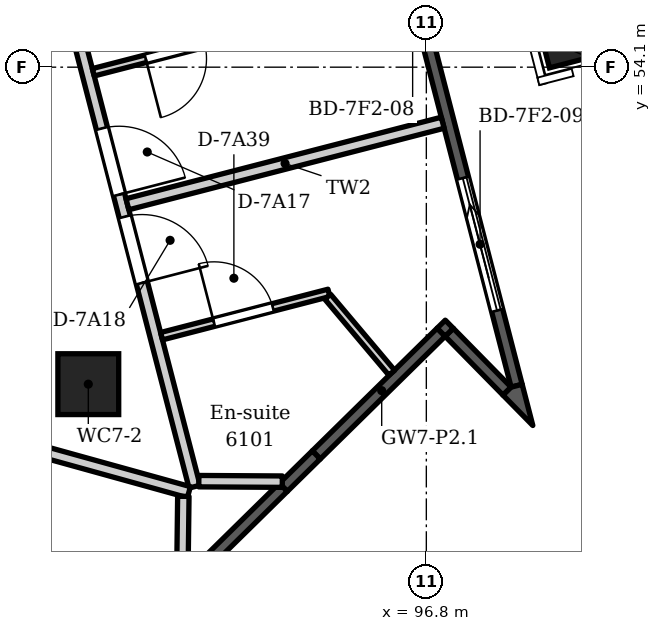
"""IFC4 building model, lengths in metres.
Left out: names, types, materials, properties, quantities, classifications, styles, units other than length and angle.
Written with IfcOpenShell. Run it as: python <this file> out.ifc"""

import sys

from ifc_helpers import new_model, si_unit, direction, frame, frame_2d, origin, origin_2d, place, context, subcontext, project, spatial, polyline, rectangle, circle, outline, extrude, element, fill, save


model = new_model("IFC4")
c1 = context("Model", 3, precision=1e-05, world=origin(), true_north=direction((0.0, 1.0)))
c2 = subcontext(c1, "Body", "Model", "MODEL_VIEW")
j1 = project(units=[si_unit("LENGTHUNIT", "METRE"), si_unit("PLANEANGLEUNIT", "RADIAN")], contexts=[c1])
p1 = place(None, origin())
s1 = spatial("IfcSite", under=j1, at=p1, CompositionType="ELEMENT")
p2 = place(p1, origin())
s2 = spatial("IfcBuilding", under=s1, at=p2, CompositionType="ELEMENT")
p3 = place(p2, frame((0.0, 0.0, 234.9)))
s3 = spatial("IfcBuildingStorey", under=s2, at=p3, CompositionType="ELEMENT", Elevation=234.9)
p4 = place(p3, frame((98.623, 54.505, -0.35), z_axis=(0.0, 0.0, 1.0), x_axis=(-0.250380004054, 0.968147640378, 0.0)))
e1 = element("IfcColumn", 1, at=p4, inside=s3, PredefinedType="COLUMN", context=c2, shape_type="SweptSolid", body=[
    extrude(rectangle(XDim=0.7, YDim=0.6, at=origin_2d()), origin(), (0.0, 0.0, 1.0), 3.95),
])
p5 = place(p3, frame((92.353, 49.93, -0.35), z_axis=(0.0, 0.0, 1.0), x_axis=(1.0, 0.0, 0.0)))
e2 = element("IfcColumn", 2, at=p5, inside=s3, PredefinedType="COLUMN", context=c2, shape_type="SweptSolid", body=[
    extrude(circle(Radius=0.4, at=origin_2d()), origin(), (0.0, 0.0, 1.0), 3.95),
])
p6 = place(p3, frame((89.591, 82.378, 0.0), z_axis=(0.0, 0.0, 1.0), x_axis=(0.250378839788, -0.968147941477, 0.0)))
e3 = element("IfcWall", 3, at=p6, inside=s3, PredefinedType="SOLIDWALL", context=c2, shape_type="SweptSolid", body=[
    extrude(outline(polyline([(0.149, 0.075), (0.149, -0.075), (33.537, -0.075), (33.537, 0.075), (0.149, 0.075)])), origin(), (0.0, 0.0, 1.0), 3.3),
])
p7 = place(p6, frame((1.171, 0.0, 0.0)))
e4 = element("IfcOpeningElement", 4, at=p7, cuts=e3, PredefinedType="OPENING", context=c2, shape_type="SweptSolid", body=[
    extrude(rectangle(XDim=1.8, YDim=2.6, at=frame_2d((0.9, 1.3))), frame((0.0, 0.085, 0.0), z_axis=(0.0, -1.0, 0.0), x_axis=(1.0, 0.0, 0.0)), (0.0, 0.0, 1.0), 0.17),
])
p8 = place(p6, frame((4.714, 0.0, 0.0)))
e5 = element("IfcOpeningElement", 5, at=p8, cuts=e3, PredefinedType="OPENING", context=c2, shape_type="SweptSolid", body=[
    extrude(rectangle(XDim=1.8, YDim=2.6, at=frame_2d((0.9, 1.3))), frame((0.0, 0.085, 0.0), z_axis=(0.0, -1.0, 0.0), x_axis=(1.0, 0.0, 0.0)), (0.0, 0.0, 1.0), 0.17),
])
p9 = place(p6, frame((8.457, 0.0, 0.0)))
e6 = element("IfcOpeningElement", 6, at=p9, cuts=e3, PredefinedType="OPENING", context=c2, shape_type="SweptSolid", body=[
    extrude(rectangle(XDim=1.8, YDim=2.6, at=frame_2d((0.9, 1.3))), frame((0.0, 0.085, 0.0), z_axis=(0.0, -1.0, 0.0), x_axis=(1.0, 0.0, 0.0)), (0.0, 0.0, 1.0), 0.17),
])
p10 = place(p6, frame((12.2, 0.0, 0.0)))
e7 = element("IfcOpeningElement", 7, at=p10, cuts=e3, PredefinedType="OPENING", context=c2, shape_type="SweptSolid", body=[
    extrude(rectangle(XDim=1.8, YDim=2.6, at=frame_2d((0.9, 1.3))), frame((0.0, 0.085, 0.0), z_axis=(0.0, -1.0, 0.0), x_axis=(1.0, 0.0, 0.0)), (0.0, 0.0, 1.0), 0.17),
])
p11 = place(p6, frame((15.943, 0.0, 0.0)))
e8 = element("IfcOpeningElement", 8, at=p11, cuts=e3, PredefinedType="OPENING", context=c2, shape_type="SweptSolid", body=[
    extrude(rectangle(XDim=1.8, YDim=2.6, at=frame_2d((0.9, 1.3))), frame((0.0, 0.085, 0.0), z_axis=(0.0, -1.0, 0.0), x_axis=(1.0, 0.0, 0.0)), (0.0, 0.0, 1.0), 0.17),
])
p12 = place(p6, frame((19.686, 0.0, 0.0)))
e9 = element("IfcOpeningElement", 9, at=p12, cuts=e3, PredefinedType="OPENING", context=c2, shape_type="SweptSolid", body=[
    extrude(rectangle(XDim=1.8, YDim=2.6, at=frame_2d((0.9, 1.3))), frame((0.0, 0.085, 0.0), z_axis=(0.0, -1.0, 0.0), x_axis=(1.0, 0.0, 0.0)), (0.0, 0.0, 1.0), 0.17),
])
p13 = place(p6, frame((23.429, 0.0, 0.0)))
e10 = element("IfcOpeningElement", 10, at=p13, cuts=e3, PredefinedType="OPENING", context=c2, shape_type="SweptSolid", body=[
    extrude(rectangle(XDim=1.8, YDim=2.6, at=frame_2d((0.9, 1.3))), frame((0.0, 0.085, 0.0), z_axis=(0.0, -1.0, 0.0), x_axis=(1.0, 0.0, 0.0)), (0.0, 0.0, 1.0), 0.17),
])
p14 = place(p6, frame((27.172, 0.0, 0.0)))
e11 = element("IfcOpeningElement", 11, at=p14, cuts=e3, PredefinedType="OPENING", context=c2, shape_type="SweptSolid", body=[
    extrude(rectangle(XDim=1.8, YDim=2.6, at=frame_2d((0.9, 1.3))), frame((0.0, 0.085, 0.0), z_axis=(0.0, -1.0, 0.0), x_axis=(1.0, 0.0, 0.0)), (0.0, 0.0, 1.0), 0.17),
])
p15 = place(p6, frame((30.715, 0.0, 0.0)))
e12 = element("IfcOpeningElement", 12, at=p15, cuts=e3, PredefinedType="OPENING", context=c2, shape_type="SweptSolid", body=[
    extrude(rectangle(XDim=1.8, YDim=2.6, at=frame_2d((0.9, 1.3))), frame((0.0, 0.085, 0.0), z_axis=(0.0, -1.0, 0.0), x_axis=(1.0, 0.0, 0.0)), (0.0, 0.0, 1.0), 0.17),
])
p16 = place(p3, frame((97.967, 49.731, 0.0), z_axis=(0.0, 0.0, 1.0), x_axis=(-0.700999978355, 0.71316129336, 0.0)))
e13 = element("IfcWall", 13, at=p16, inside=s3, PredefinedType="SOLIDWALL", context=c2, shape_type="SweptSolid", body=[
    extrude(outline(polyline([(0.149, 0.075), (0.149, -0.075), (1.235, -0.075), (1.235, 0.075), (0.149, 0.075)])), origin(), (0.0, 0.0, 1.0), 3.3),
])
p17 = place(p3, frame((97.073, 50.69, 0.0), z_axis=(0.0, 0.0, 1.0), x_axis=(-0.713250368354, -0.700909346522, 0.0)))
e14 = element("IfcWall", 14, at=p17, inside=s3, PredefinedType="SOLIDWALL", context=c2, shape_type="SweptSolid", body=[
    extrude(outline(polyline([(0.11, -0.075), (2.414, -0.075), (2.414, 0.075), (0.11, 0.075), (0.11, -0.075)])), origin(), (0.0, 0.0, 1.0), 3.3),
])
p18 = place(p3, frame((95.352, 48.999, 0.0), z_axis=(0.0, 0.0, 1.0), x_axis=(-0.713304727682, -0.700854025791, 0.0)))
e15 = element("IfcWall", 15, at=p18, inside=s3, PredefinedType="SOLIDWALL", context=c2, shape_type="SweptSolid", body=[
    extrude(outline(polyline([(0.0, -0.075), (0.608, -0.075), (0.608, 0.075), (0.0, 0.075), (0.0, -0.075)])), origin(), (0.0, 0.0, 1.0), 2.75),
])
p19 = place(p3, frame((94.918, 48.573, 0.0), z_axis=(0.0, 0.0, 1.0), x_axis=(-0.713193839807, -0.700966865737, 0.0)))
e16 = element("IfcWall", 16, at=p19, inside=s3, PredefinedType="SOLIDWALL", context=c2, shape_type="SweptSolid", body=[
    extrude(outline(polyline([(0.0, -0.075), (1.757, -0.075), (1.757, 0.075), (0.0, 0.075), (0.0, -0.075)])), origin(), (0.0, 0.0, 1.0), 3.3),
])
p20 = place(p3, frame((92.419, 44.255, 0.0), z_axis=(0.0, 0.0, 1.0), x_axis=(-0.963630586427, 0.267237895708, 0.0)))
e17 = element("IfcWall", 17, at=p20, inside=s3, PredefinedType="SOLIDWALL", context=c2, shape_type="SweptSolid", body=[
    extrude(outline(polyline([(0.149, 0.075), (0.149, -0.075), (33.537, -0.075), (33.537, 0.075), (0.149, 0.075)])), origin(), (0.0, 0.0, 1.0), 3.3),
])
p21 = place(p20, frame((1.171, 0.0, 0.0)))
e18 = element("IfcOpeningElement", 18, at=p21, cuts=e17, PredefinedType="OPENING", context=c2, shape_type="SweptSolid", body=[
    extrude(rectangle(XDim=1.8, YDim=2.6, at=frame_2d((0.9, 1.3))), frame((0.0, 0.085, 0.0), z_axis=(0.0, -1.0, 0.0), x_axis=(1.0, 0.0, 0.0)), (0.0, 0.0, 1.0), 0.17),
])
p22 = place(p20, frame((4.714, 0.0, 0.0)))
e19 = element("IfcOpeningElement", 19, at=p22, cuts=e17, PredefinedType="OPENING", context=c2, shape_type="SweptSolid", body=[
    extrude(rectangle(XDim=1.8, YDim=2.6, at=frame_2d((0.9, 1.3))), frame((0.0, 0.085, 0.0), z_axis=(0.0, -1.0, 0.0), x_axis=(1.0, 0.0, 0.0)), (0.0, 0.0, 1.0), 0.17),
])
p23 = place(p20, frame((8.457, 0.0, 0.0)))
e20 = element("IfcOpeningElement", 20, at=p23, cuts=e17, PredefinedType="OPENING", context=c2, shape_type="SweptSolid", body=[
    extrude(rectangle(XDim=1.8, YDim=2.6, at=frame_2d((0.9, 1.3))), frame((0.0, 0.085, 0.0), z_axis=(0.0, -1.0, 0.0), x_axis=(1.0, 0.0, 0.0)), (0.0, 0.0, 1.0), 0.17),
])
p24 = place(p20, frame((12.2, 0.0, 0.0)))
e21 = element("IfcOpeningElement", 21, at=p24, cuts=e17, PredefinedType="OPENING", context=c2, shape_type="SweptSolid", body=[
    extrude(rectangle(XDim=1.8, YDim=2.6, at=frame_2d((0.9, 1.3))), frame((0.0, 0.085, 0.0), z_axis=(0.0, -1.0, 0.0), x_axis=(1.0, 0.0, 0.0)), (0.0, 0.0, 1.0), 0.17),
])
p25 = place(p20, frame((15.943, 0.0, 0.0)))
e22 = element("IfcOpeningElement", 22, at=p25, cuts=e17, PredefinedType="OPENING", context=c2, shape_type="SweptSolid", body=[
    extrude(rectangle(XDim=1.8, YDim=2.6, at=frame_2d((0.9, 1.3))), frame((0.0, 0.085, 0.0), z_axis=(0.0, -1.0, 0.0), x_axis=(1.0, 0.0, 0.0)), (0.0, 0.0, 1.0), 0.17),
])
p26 = place(p20, frame((19.686, 0.0, 0.0)))
e23 = element("IfcOpeningElement", 23, at=p26, cuts=e17, PredefinedType="OPENING", context=c2, shape_type="SweptSolid", body=[
    extrude(rectangle(XDim=1.8, YDim=2.6, at=frame_2d((0.9, 1.3))), frame((0.0, 0.085, 0.0), z_axis=(0.0, -1.0, 0.0), x_axis=(1.0, 0.0, 0.0)), (0.0, 0.0, 1.0), 0.17),
])
p27 = place(p20, frame((23.429, 0.0, 0.0)))
e24 = element("IfcOpeningElement", 24, at=p27, cuts=e17, PredefinedType="OPENING", context=c2, shape_type="SweptSolid", body=[
    extrude(rectangle(XDim=1.8, YDim=2.6, at=frame_2d((0.9, 1.3))), frame((0.0, 0.085, 0.0), z_axis=(0.0, -1.0, 0.0), x_axis=(1.0, 0.0, 0.0)), (0.0, 0.0, 1.0), 0.17),
])
p28 = place(p20, frame((27.172, 0.0, 0.0)))
e25 = element("IfcOpeningElement", 25, at=p28, cuts=e17, PredefinedType="OPENING", context=c2, shape_type="SweptSolid", body=[
    extrude(rectangle(XDim=1.8, YDim=2.6, at=frame_2d((0.9, 1.3))), frame((0.0, 0.085, 0.0), z_axis=(0.0, -1.0, 0.0), x_axis=(1.0, 0.0, 0.0)), (0.0, 0.0, 1.0), 0.17),
])
p29 = place(p20, frame((30.715, 0.0, 0.0)))
e26 = element("IfcOpeningElement", 26, at=p29, cuts=e17, PredefinedType="OPENING", context=c2, shape_type="SweptSolid", body=[
    extrude(rectangle(XDim=1.8, YDim=2.6, at=frame_2d((0.9, 1.3))), frame((0.0, 0.085, 0.0), z_axis=(0.0, -1.0, 0.0), x_axis=(1.0, 0.0, 0.0)), (0.0, 0.0, 1.0), 0.17),
])
p30 = place(p3, origin())
e27 = element("IfcWall", 27, at=p30, inside=s3, PredefinedType="PARAPET", context=c2, shape_type="SweptSolid", body=[
    extrude(outline(polyline([(59.388, 50.961), (96.326, 36.411), (96.275, 36.753), (62.154, 50.194), (59.388, 50.961)])), origin(), (0.0, 0.0, 1.0), 1.1),
])
p31 = place(p3, origin())
e28 = element("IfcWall", 28, at=p31, inside=s3, PredefinedType="PARAPET", context=c2, shape_type="SweptSolid", body=[
    extrude(outline(polyline([(100.299, 50.419), (94.431, 89.683), (94.16, 89.468), (99.581, 53.198), (100.299, 50.419)])), origin(), (0.0, 0.0, 1.0), 1.1),
])
p32 = place(p3, frame((91.355, 57.841, 0.0), z_axis=(0.0, 0.0, 1.0), x_axis=(0.25042530879, -0.968135922646, 0.0)))
e29 = element("IfcWall", 29, at=p32, inside=s3, PredefinedType="PARTITIONING", context=c2, shape_type="SweptSolid", body=[
    extrude(rectangle(XDim=9.565, YDim=0.15, at=frame_2d((4.782, 0.0))), origin(), (0.0, 0.0, 1.0), 2.75),
])
p33 = place(p32, frame((4.697, 0.0, 0.0)))
e30 = element("IfcOpeningElement", 30, at=p33, cuts=e29, PredefinedType="OPENING", context=c2, shape_type="SweptSolid", body=[
    extrude(rectangle(XDim=0.9, YDim=2.1, at=frame_2d((0.45, 1.05))), frame((0.0, 0.085, 0.0), z_axis=(0.0, -1.0, 0.0), x_axis=(1.0, 0.0, 0.0)), (0.0, 0.0, 1.0), 0.17),
])
p34 = place(p32, frame((5.897, 0.0, 0.0)))
e31 = element("IfcOpeningElement", 31, at=p34, cuts=e29, PredefinedType="OPENING", context=c2, shape_type="SweptSolid", body=[
    extrude(rectangle(XDim=0.9, YDim=2.1, at=frame_2d((0.45, 1.05))), frame((0.0, 0.085, 0.0), z_axis=(0.0, -1.0, 0.0), x_axis=(1.0, 0.0, 0.0)), (0.0, 0.0, 1.0), 0.17),
])
p35 = place(p3, frame((91.673, 49.064, 0.0), z_axis=(0.0, 0.0, 1.0), x_axis=(0.963652381101, -0.267159294054, 0.0)))
e32 = element("IfcWall", 32, at=p35, inside=s3, PredefinedType="PARTITIONING", context=c2, shape_type="SweptSolid", body=[
    extrude(rectangle(XDim=2.079, YDim=0.15, at=frame_2d((1.04, 0.0))), origin(), (0.0, 0.0, 1.0), 2.75),
])
p36 = place(p3, frame((92.419, 54.033, 0.0), z_axis=(0.0, 0.0, 1.0), x_axis=(0.968205218878, 0.250157258814, 0.0)))
e33 = element("IfcWall", 33, at=p36, inside=s3, PredefinedType="PARTITIONING", context=c2, shape_type="SweptSolid", body=[
    extrude(rectangle(XDim=2.274, YDim=0.1, at=frame_2d((1.137, 0.0))), origin(), (0.0, 0.0, 1.0), 3.3),
])
p37 = place(p36, frame((0.712, 0.0, 0.0)))
e34 = element("IfcOpeningElement", 34, at=p37, cuts=e33, PredefinedType="OPENING", context=c2, shape_type="SweptSolid", body=[
    extrude(rectangle(XDim=0.8, YDim=2.1, at=frame_2d((0.4, 1.05))), frame((0.0, 0.06, 0.0), z_axis=(0.0, -1.0, 0.0), x_axis=(1.0, 0.0, 0.0)), (0.0, 0.0, 1.0), 0.12),
])
p38 = place(p3, frame((92.868, 52.297, 0.0), z_axis=(0.0, 0.0, 1.0), x_axis=(0.968184295309, 0.250238227129, 0.0)))
e35 = element("IfcWall", 35, at=p38, inside=s3, PredefinedType="PARTITIONING", context=c2, shape_type="SweptSolid", body=[
    extrude(rectangle(XDim=4.284, YDim=0.15, at=frame_2d((2.142, 0.0))), origin(), (0.0, 0.0, 1.0), 3.3),
])
p39 = place(p3, frame((93.317, 50.561, 0.0), z_axis=(0.0, 0.0, 1.0), x_axis=(0.968101130966, 0.25055977375, 0.0)))
e36 = element("IfcWall", 36, at=p39, inside=s3, PredefinedType="PARTITIONING", context=c2, shape_type="SweptSolid", body=[
    extrude(rectangle(XDim=2.274, YDim=0.1, at=frame_2d((1.137, 0.0))), origin(), (0.0, 0.0, 1.0), 3.3),
])
p40 = place(p39, frame((0.712, 0.0, 0.0)))
e37 = element("IfcOpeningElement", 37, at=p40, cuts=e36, PredefinedType="OPENING", context=c2, shape_type="SweptSolid", body=[
    extrude(rectangle(XDim=0.8, YDim=2.1, at=frame_2d((0.4, 1.05))), frame((0.0, 0.06, 0.0), z_axis=(0.0, -1.0, 0.0), x_axis=(1.0, 0.0, 0.0)), (0.0, 0.0, 1.0), 0.12),
])
for number, where, z_axis, x_axis in (
    (38, (93.59, 47.356, 0.0), (0.0, 0.0, 1.0), (0.012, 1.0, 0.0)),
    (39, (93.807, 48.654, 0.0), (0.0, 0.0, 1.0), (1.0, -0.006, 0.0)),
):
    element("IfcWall", number, at=place(p3, frame(where, z_axis=z_axis, x_axis=x_axis)), inside=s3, PredefinedType="PARTITIONING", context=c2, shape_type="SweptSolid", body=[
        extrude(rectangle(XDim=1.098, YDim=0.15, at=frame_2d((0.549, 0.0))), origin(), (0.0, 0.0, 1.0), 2.75),
    ])
p41 = place(p3, frame((95.502, 51.08, 0.0), z_axis=(0.0, 0.0, 1.0), x_axis=(0.644451791136, -0.76464494303, 0.0)))
e40 = element("IfcWall", 40, at=p41, inside=s3, PredefinedType="PARTITIONING", context=c2, shape_type="SweptSolid", body=[
    extrude(rectangle(XDim=1.308, YDim=0.1, at=frame_2d((0.654, 0.0))), origin(), (0.0, 0.0, 1.0), 3.3),
])
p42 = place(p15, origin())
e41 = element("IfcDoor", 41, at=p42, inside=s3, OperationType="SLIDING_TO_LEFT", PredefinedType="DOOR", context=c2, shape_type="SweptSolid", body=[
    extrude(rectangle(XDim=1.8, YDim=2.6, at=frame_2d((0.9, 1.3))), frame((0.0, 0.025, 0.0), z_axis=(0.0, -1.0, 0.0), x_axis=(1.0, 0.0, 0.0)), (0.0, 0.0, 1.0), 0.05),
])
fill(e12, e41)
p43 = place(p33, origin())
e42 = element("IfcDoor", 42, at=p43, inside=s3, OperationType="SINGLE_SWING_RIGHT", PredefinedType="DOOR", context=c2, shape_type="SweptSolid", body=[
    extrude(rectangle(XDim=0.9, YDim=2.1, at=frame_2d((0.45, 1.05))), frame((0.0, 0.025, 0.0), z_axis=(0.0, -1.0, 0.0), x_axis=(1.0, 0.0, 0.0)), (0.0, 0.0, 1.0), 0.05),
])
fill(e30, e42)
p44 = place(p34, origin())
e43 = element("IfcDoor", 43, at=p44, inside=s3, OperationType="SINGLE_SWING_RIGHT", PredefinedType="DOOR", context=c2, shape_type="SweptSolid", body=[
    extrude(rectangle(XDim=0.9, YDim=2.1, at=frame_2d((0.45, 1.05))), frame((0.0, 0.025, 0.0), z_axis=(0.0, -1.0, 0.0), x_axis=(1.0, 0.0, 0.0)), (0.0, 0.0, 1.0), 0.05),
])
fill(e31, e43)
p45 = place(p37, frame((0.8, 0.0, 0.0), z_axis=(0.0, 0.0, 1.0), x_axis=(-1.0, 0.0, 0.0)))
e44 = element("IfcDoor", 44, at=p45, inside=s3, OperationType="SINGLE_SWING_RIGHT", PredefinedType="DOOR", context=c2, shape_type="SweptSolid", body=[
    extrude(rectangle(XDim=0.8, YDim=2.1, at=frame_2d((0.4, 1.05))), frame((0.0, 0.025, 0.0), z_axis=(0.0, -1.0, 0.0), x_axis=(1.0, 0.0, 0.0)), (0.0, 0.0, 1.0), 0.05),
])
fill(e34, e44)
p46 = place(p40, origin())
e45 = element("IfcDoor", 45, at=p46, inside=s3, OperationType="SINGLE_SWING_LEFT", PredefinedType="DOOR", context=c2, shape_type="SweptSolid", body=[
    extrude(rectangle(XDim=0.8, YDim=2.1, at=frame_2d((0.4, 1.05))), frame((0.0, 0.025, 0.0), z_axis=(0.0, -1.0, 0.0), x_axis=(1.0, 0.0, 0.0)), (0.0, 0.0, 1.0), 0.05),
])
fill(e37, e45)
save(model, sys.argv[1])
